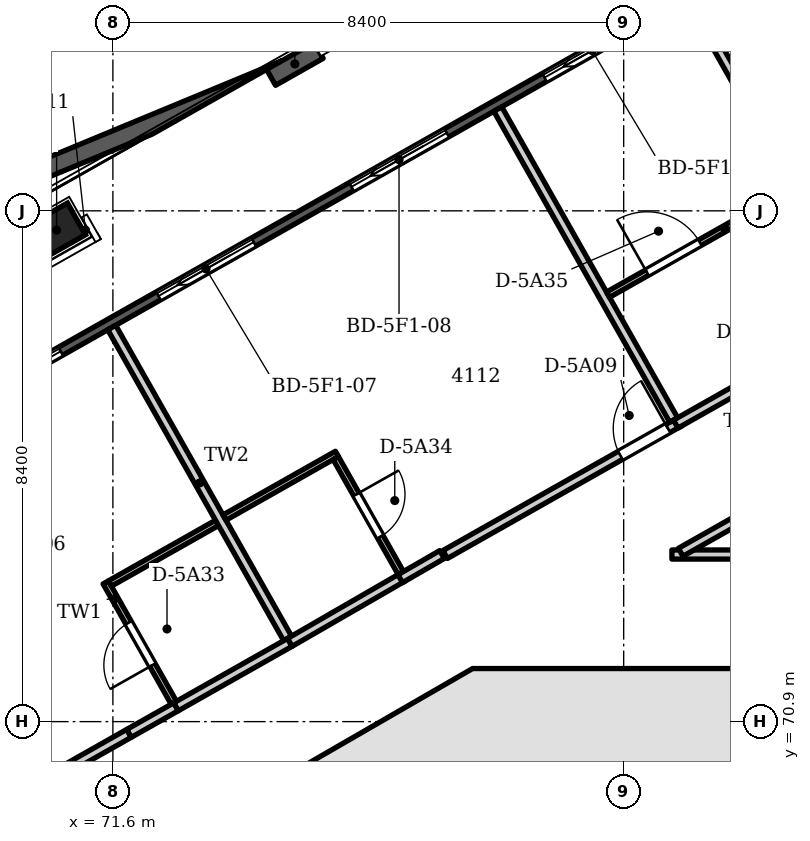
"""IFC4 building model, lengths in metres.
Left out: names, types, materials, properties, quantities, classifications, styles, units other than length and angle.
Written with IfcOpenShell. Run it as: python <this file> out.ifc"""

import sys

from ifc_helpers import new_model, si_unit, direction, frame, frame_2d, origin, origin_2d, place, context, subcontext, project, spatial, polyline, rectangle, outline, extrude, element, fill, save


model = new_model("IFC4")
c1 = context("Model", 3, precision=1e-05, world=origin(), true_north=direction((0.0, 1.0)))
c2 = subcontext(c1, "Body", "Model", "MODEL_VIEW")
j1 = project(units=[si_unit("LENGTHUNIT", "METRE"), si_unit("PLANEANGLEUNIT", "RADIAN")], contexts=[c1])
p1 = place(None, origin())
s1 = spatial("IfcSite", under=j1, at=p1, CompositionType="ELEMENT")
p2 = place(p1, origin())
s2 = spatial("IfcBuilding", under=s1, at=p2, CompositionType="ELEMENT")
p3 = place(p2, frame((0.0, 0.0, 161.1)))
s3 = spatial("IfcBuildingStorey", under=s2, at=p3, CompositionType="ELEMENT", Elevation=161.1)
p4 = place(p3, frame((82.485, 71.323, 0.0), z_axis=(0.0, 0.0, 1.0), x_axis=(-1.0, 0.0, 0.0)))
e1 = element("IfcWall", 1, at=p4, inside=s3, PredefinedType="SHEAR", context=c2, shape_type="SweptSolid", body=[
    extrude(outline(polyline([(0.0, -0.45), (4.969, -0.45), (4.728, 0.45), (0.241, 0.45), (0.0, -0.45)])), origin(), (0.0, 0.0, 1.0), 3.6),
])
p5 = place(p4, frame((1.785, 0.0, 0.0)))
e2 = element("IfcOpeningElement", 2, at=p5, cuts=e1, PredefinedType="OPENING", context=c2, shape_type="SweptSolid", body=[
    extrude(rectangle(XDim=1.4, YDim=2.1, at=frame_2d((0.7, 1.05))), frame((0.0, 0.46, 0.0), z_axis=(0.0, -1.0, 0.0), x_axis=(1.0, 0.0, 0.0)), (0.0, 0.0, 1.0), 0.92),
])
p6 = place(p3, frame((77.74, 71.383, 0.0), z_axis=(0.0, 0.0, 1.0), x_axis=(-0.866003133579, -0.500038571144, 0.0)))
e3 = element("IfcWall", 3, at=p6, inside=s3, PredefinedType="SHEAR", context=c2, shape_type="SweptSolid", body=[
    extrude(outline(polyline([(0.0, -0.45), (4.969, -0.45), (4.728, 0.45), (0.241, 0.45), (0.0, -0.45)])), origin(), (0.0, 0.0, 1.0), 3.6),
])
p7 = place(p6, frame((0.895, 0.0, 0.0)))
e4 = element("IfcOpeningElement", 4, at=p7, cuts=e3, PredefinedType="OPENING", context=c2, shape_type="SweptSolid", body=[
    extrude(rectangle(XDim=0.9, YDim=2.1, at=frame_2d((0.45, 1.05))), frame((0.0, 0.46, 0.0), z_axis=(0.0, -1.0, 0.0), x_axis=(1.0, 0.0, 0.0)), (0.0, 0.0, 1.0), 0.92),
])
p8 = place(p6, frame((3.184, 0.0, 0.0)))
e5 = element("IfcOpeningElement", 5, at=p8, cuts=e3, PredefinedType="OPENING", context=c2, shape_type="SweptSolid", body=[
    extrude(rectangle(XDim=0.9, YDim=2.1, at=frame_2d((0.45, 1.05))), frame((0.0, 0.46, 0.0), z_axis=(0.0, -1.0, 0.0), x_axis=(1.0, 0.0, 0.0)), (0.0, 0.0, 1.0), 0.92),
])
for number, where, z_axis, x_axis in (
    (6, (78.425, 63.001, 0.0), (0.0, 0.0, 1.0), (0.0, 1.0, 0.0)),
    (7, (81.575, 63.001, 0.0), (0.0, 0.0, 1.0), (0.0, 1.0, 0.0)),
):
    element("IfcWall", number, at=place(p3, frame(where, z_axis=z_axis, x_axis=x_axis)), inside=s3, PredefinedType="SHEAR", context=c2, shape_type="SweptSolid", body=[
        extrude(rectangle(XDim=7.872, YDim=0.3, at=frame_2d((3.936, 0.0))), origin(), (0.0, 0.0, 1.0), 3.6),
    ])
p9 = place(p3, frame((70.675, 78.982, -0.35), z_axis=(0.0, 0.0, 1.0), x_axis=(0.87035569594, 0.492423560103, 0.0)))
e8 = element("IfcColumn", 8, at=p9, inside=s3, PredefinedType="COLUMN", context=c2, shape_type="SweptSolid", body=[
    extrude(rectangle(XDim=0.75, YDim=0.6, at=origin_2d()), origin(), (0.0, 0.0, 1.0), 3.95),
])
p10 = place(p3, frame((52.498, 66.67, 0.0), z_axis=(0.0, 0.0, 1.0), x_axis=(0.870354973249, 0.492424837453, 0.0)))
e9 = element("IfcWall", 9, at=p10, inside=s3, PredefinedType="SOLIDWALL", context=c2, shape_type="SweptSolid", body=[
    extrude(outline(polyline([(0.149, 0.075), (0.149, -0.075), (43.617, -0.075), (43.617, 0.075), (0.149, 0.075)])), origin(), (0.0, 0.0, 1.0), 3.3),
])
p11 = place(p10, frame((1.224, 0.0, 0.0)))
e10 = element("IfcOpeningElement", 10, at=p11, cuts=e9, PredefinedType="OPENING", context=c2, shape_type="SweptSolid", body=[
    extrude(rectangle(XDim=1.8, YDim=2.6, at=frame_2d((0.9, 1.3))), frame((0.0, 0.085, 0.0), z_axis=(0.0, -1.0, 0.0), x_axis=(1.0, 0.0, 0.0)), (0.0, 0.0, 1.0), 0.17),
])
p12 = place(p10, frame((4.571, 0.0, 0.0)))
e11 = element("IfcOpeningElement", 11, at=p12, cuts=e9, PredefinedType="OPENING", context=c2, shape_type="SweptSolid", body=[
    extrude(rectangle(XDim=1.8, YDim=2.6, at=frame_2d((0.9, 1.3))), frame((0.0, 0.085, 0.0), z_axis=(0.0, -1.0, 0.0), x_axis=(1.0, 0.0, 0.0)), (0.0, 0.0, 1.0), 0.17),
])
p13 = place(p10, frame((8.218, 0.0, 0.0)))
e12 = element("IfcOpeningElement", 12, at=p13, cuts=e9, PredefinedType="OPENING", context=c2, shape_type="SweptSolid", body=[
    extrude(rectangle(XDim=1.8, YDim=2.6, at=frame_2d((0.9, 1.3))), frame((0.0, 0.085, 0.0), z_axis=(0.0, -1.0, 0.0), x_axis=(1.0, 0.0, 0.0)), (0.0, 0.0, 1.0), 0.17),
])
p14 = place(p10, frame((11.865, 0.0, 0.0)))
e13 = element("IfcOpeningElement", 13, at=p14, cuts=e9, PredefinedType="OPENING", context=c2, shape_type="SweptSolid", body=[
    extrude(rectangle(XDim=1.8, YDim=2.6, at=frame_2d((0.9, 1.3))), frame((0.0, 0.085, 0.0), z_axis=(0.0, -1.0, 0.0), x_axis=(1.0, 0.0, 0.0)), (0.0, 0.0, 1.0), 0.17),
])
p15 = place(p10, frame((15.512, 0.0, 0.0)))
e14 = element("IfcOpeningElement", 14, at=p15, cuts=e9, PredefinedType="OPENING", context=c2, shape_type="SweptSolid", body=[
    extrude(rectangle(XDim=1.8, YDim=2.6, at=frame_2d((0.9, 1.3))), frame((0.0, 0.085, 0.0), z_axis=(0.0, -1.0, 0.0), x_axis=(1.0, 0.0, 0.0)), (0.0, 0.0, 1.0), 0.17),
])
p16 = place(p10, frame((19.16, 0.0, 0.0)))
e15 = element("IfcOpeningElement", 15, at=p16, cuts=e9, PredefinedType="OPENING", context=c2, shape_type="SweptSolid", body=[
    extrude(rectangle(XDim=1.8, YDim=2.6, at=frame_2d((0.9, 1.3))), frame((0.0, 0.085, 0.0), z_axis=(0.0, -1.0, 0.0), x_axis=(1.0, 0.0, 0.0)), (0.0, 0.0, 1.0), 0.17),
])
p17 = place(p10, frame((22.807, 0.0, 0.0)))
e16 = element("IfcOpeningElement", 16, at=p17, cuts=e9, PredefinedType="OPENING", context=c2, shape_type="SweptSolid", body=[
    extrude(rectangle(XDim=1.8, YDim=2.6, at=frame_2d((0.9, 1.3))), frame((0.0, 0.085, 0.0), z_axis=(0.0, -1.0, 0.0), x_axis=(1.0, 0.0, 0.0)), (0.0, 0.0, 1.0), 0.17),
])
p18 = place(p10, frame((26.454, 0.0, 0.0)))
e17 = element("IfcOpeningElement", 17, at=p18, cuts=e9, PredefinedType="OPENING", context=c2, shape_type="SweptSolid", body=[
    extrude(rectangle(XDim=1.8, YDim=2.6, at=frame_2d((0.9, 1.3))), frame((0.0, 0.085, 0.0), z_axis=(0.0, -1.0, 0.0), x_axis=(1.0, 0.0, 0.0)), (0.0, 0.0, 1.0), 0.17),
])
p19 = place(p10, frame((30.101, 0.0, 0.0)))
e18 = element("IfcOpeningElement", 18, at=p19, cuts=e9, PredefinedType="OPENING", context=c2, shape_type="SweptSolid", body=[
    extrude(rectangle(XDim=1.8, YDim=2.6, at=frame_2d((0.9, 1.3))), frame((0.0, 0.085, 0.0), z_axis=(0.0, -1.0, 0.0), x_axis=(1.0, 0.0, 0.0)), (0.0, 0.0, 1.0), 0.17),
])
p20 = place(p10, frame((33.748, 0.0, 0.0)))
e19 = element("IfcOpeningElement", 19, at=p20, cuts=e9, PredefinedType="OPENING", context=c2, shape_type="SweptSolid", body=[
    extrude(rectangle(XDim=1.8, YDim=2.6, at=frame_2d((0.9, 1.3))), frame((0.0, 0.085, 0.0), z_axis=(0.0, -1.0, 0.0), x_axis=(1.0, 0.0, 0.0)), (0.0, 0.0, 1.0), 0.17),
])
p21 = place(p10, frame((37.396, 0.0, 0.0)))
e20 = element("IfcOpeningElement", 20, at=p21, cuts=e9, PredefinedType="OPENING", context=c2, shape_type="SweptSolid", body=[
    extrude(rectangle(XDim=1.8, YDim=2.6, at=frame_2d((0.9, 1.3))), frame((0.0, 0.085, 0.0), z_axis=(0.0, -1.0, 0.0), x_axis=(1.0, 0.0, 0.0)), (0.0, 0.0, 1.0), 0.17),
])
p22 = place(p10, frame((40.743, 0.0, 0.0)))
e21 = element("IfcOpeningElement", 21, at=p22, cuts=e9, PredefinedType="OPENING", context=c2, shape_type="SweptSolid", body=[
    extrude(rectangle(XDim=1.8, YDim=2.6, at=frame_2d((0.9, 1.3))), frame((0.0, 0.085, 0.0), z_axis=(0.0, -1.0, 0.0), x_axis=(1.0, 0.0, 0.0)), (0.0, 0.0, 1.0), 0.17),
])
p23 = place(p3, origin())
e22 = element("IfcWall", 22, at=p23, inside=s3, PredefinedType="PARAPET", context=c2, shape_type="SweptSolid", body=[
    extrude(outline(polyline([(74.388, 81.773), (46.836, 70.36), (47.111, 70.149), (72.246, 80.561), (74.388, 81.773)])), origin(), (0.0, 0.0, 1.0), 1.1),
])
p24 = place(p3, origin())
e23 = element("IfcWall", 23, at=p24, inside=s3, PredefinedType="PARAPET", context=c2, shape_type="SweptSolid", body=[
    extrude(outline(polyline([(74.127, 81.625), (74.275, 81.364), (75.058, 81.807), (74.91, 82.068), (74.88, 82.051), (74.127, 81.625)])), origin(), (0.0, 0.0, 1.0), 1.1),
])
p25 = place(p3, frame((65.831, 67.292, 0.0), z_axis=(0.0, 0.0, 1.0), x_axis=(0.870315513683, 0.492494575242, 0.0)))
e24 = element("IfcWall", 24, at=p25, inside=s3, PredefinedType="PARTITIONING", context=c2, shape_type="SweptSolid", body=[
    extrude(rectangle(XDim=6.934, YDim=0.15, at=frame_2d((3.467, 0.0))), origin(), (0.0, 0.0, 1.0), 3.3),
])
p26 = place(p25, frame((0.15, 0.0, 0.0)))
e25 = element("IfcOpeningElement", 25, at=p26, cuts=e24, PredefinedType="OPENING", context=c2, shape_type="SweptSolid", body=[
    extrude(rectangle(XDim=0.9, YDim=2.1, at=frame_2d((0.45, 1.05))), frame((0.0, 0.085, 0.0), z_axis=(0.0, -1.0, 0.0), x_axis=(1.0, 0.0, 0.0)), (0.0, 0.0, 1.0), 0.17),
])
p27 = place(p3, frame((71.482, 73.189, 0.0), z_axis=(0.0, 0.0, 1.0), x_axis=(0.492181026221, -0.870492870406, 0.0)))
e26 = element("IfcWall", 26, at=p27, inside=s3, PredefinedType="PARTITIONING", context=c2, shape_type="SweptSolid", body=[
    extrude(rectangle(XDim=2.275, YDim=0.1, at=frame_2d((1.137, 0.0))), origin(), (0.0, 0.0, 1.0), 3.3),
])
p28 = place(p27, frame((0.762, 0.0, 0.0)))
e27 = element("IfcOpeningElement", 27, at=p28, cuts=e26, PredefinedType="OPENING", context=c2, shape_type="SweptSolid", body=[
    extrude(rectangle(XDim=0.8, YDim=2.1, at=frame_2d((0.4, 1.05))), frame((0.0, 0.06, 0.0), z_axis=(0.0, -1.0, 0.0), x_axis=(1.0, 0.0, 0.0)), (0.0, 0.0, 1.0), 0.12),
])
p29 = place(p3, frame((71.551, 73.171, 0.0), z_axis=(0.0, 0.0, 1.0), x_axis=(0.87023930122, 0.492629230367, 0.0)))
e28 = element("IfcWall", 28, at=p29, inside=s3, PredefinedType="PARTITIONING", context=c2, shape_type="SweptSolid", body=[
    extrude(rectangle(XDim=2.025, YDim=0.1, at=frame_2d((1.012, 0.0))), origin(), (0.0, 0.0, 1.0), 3.3),
])
p30 = place(p3, frame((71.581, 77.381, 0.0), z_axis=(0.0, 0.0, 1.0), x_axis=(0.4923790567, -0.870380873252, 0.0)))
e29 = element("IfcWall", 29, at=p30, inside=s3, PredefinedType="PARTITIONING", context=c2, shape_type="SweptSolid", body=[
    extrude(rectangle(XDim=5.874, YDim=0.15, at=frame_2d((2.937, 0.0))), origin(), (0.0, 0.0, 1.0), 3.3),
])
p31 = place(p3, frame((71.866, 70.707, 0.0), z_axis=(0.0, 0.0, 1.0), x_axis=(0.870501381105, 0.492165973524, 0.0)))
e30 = element("IfcWall", 30, at=p31, inside=s3, PredefinedType="PARTITIONING", context=c2, shape_type="SweptSolid", body=[
    extrude(rectangle(XDim=0.888, YDim=0.15, at=frame_2d((0.444, 0.0))), origin(), (0.0, 0.0, 1.0), 3.3),
])
p32 = place(p3, frame((72.639, 71.144, 0.0), z_axis=(0.0, 0.0, 1.0), x_axis=(0.870311041837, 0.492502477615, 0.0)))
e31 = element("IfcWall", 31, at=p32, inside=s3, PredefinedType="PARTITIONING", context=c2, shape_type="SweptSolid", body=[
    extrude(rectangle(XDim=2.15, YDim=0.15, at=frame_2d((1.075, 0.0))), origin(), (0.0, 0.0, 1.0), 3.3),
])
p33 = place(p3, frame((73.435, 74.256, 0.0), z_axis=(0.0, 0.0, 1.0), x_axis=(0.870265219316, 0.492583442726, 0.0)))
e32 = element("IfcWall", 32, at=p33, inside=s3, PredefinedType="PARTITIONING", context=c2, shape_type="SweptSolid", body=[
    extrude(rectangle(XDim=2.125, YDim=0.1, at=frame_2d((1.062, 0.0))), origin(), (0.0, 0.0, 1.0), 3.3),
])
p34 = place(p3, frame((74.51, 72.203, 0.0), z_axis=(0.0, 0.0, 1.0), x_axis=(0.865945810508, 0.500137834266, 0.0)))
e33 = element("IfcWall", 33, at=p34, inside=s3, PredefinedType="PARTITIONING", context=c2, shape_type="SweptSolid", body=[
    extrude(rectangle(XDim=2.154, YDim=0.15, at=frame_2d((1.077, 0.0))), origin(), (0.0, 0.0, 1.0), 3.3),
])
p35 = place(p3, frame((75.266, 75.235, 0.0), z_axis=(0.0, 0.0, 1.0), x_axis=(0.492249770031, -0.870453998729, 0.0)))
e34 = element("IfcWall", 34, at=p35, inside=s3, PredefinedType="PARTITIONING", context=c2, shape_type="SweptSolid", body=[
    extrude(rectangle(XDim=2.173, YDim=0.1, at=frame_2d((1.086, 0.0))), origin(), (0.0, 0.0, 1.0), 3.3),
])
p36 = place(p35, frame((0.686, 0.0, 0.0)))
e35 = element("IfcOpeningElement", 35, at=p36, cuts=e34, PredefinedType="OPENING", context=c2, shape_type="SweptSolid", body=[
    extrude(rectangle(XDim=0.8, YDim=2.1, at=frame_2d((0.4, 1.05))), frame((0.0, 0.06, 0.0), z_axis=(0.0, -1.0, 0.0), x_axis=(1.0, 0.0, 0.0)), (0.0, 0.0, 1.0), 0.12),
])
p37 = place(p3, frame((76.326, 73.251, 0.0), z_axis=(0.0, 0.0, 1.0), x_axis=(0.865924288798, 0.500175095412, 0.0)))
e36 = element("IfcWall", 36, at=p37, inside=s3, PredefinedType="PARTITIONING", context=c2, shape_type="SweptSolid", body=[
    extrude(rectangle(XDim=0.794, YDim=0.15, at=frame_2d((0.397, 0.0))), origin(), (0.0, 0.0, 1.0), 3.3),
])
p38 = place(p3, frame((77.064, 73.648, 0.0), z_axis=(0.0, 0.0, 1.0), x_axis=(0.870327135276, 0.492474037491, 0.0)))
e37 = element("IfcWall", 37, at=p38, inside=s3, PredefinedType="PARTITIONING", context=c2, shape_type="SweptSolid", body=[
    extrude(rectangle(XDim=4.439, YDim=0.15, at=frame_2d((2.219, 0.0))), origin(), (0.0, 0.0, 1.0), 3.3),
])
p39 = place(p38, frame((3.31, 0.0, 0.0)))
e38 = element("IfcOpeningElement", 38, at=p39, cuts=e37, PredefinedType="OPENING", context=c2, shape_type="SweptSolid", body=[
    extrude(rectangle(XDim=0.9, YDim=2.1, at=frame_2d((0.45, 1.05))), frame((0.0, 0.085, 0.0), z_axis=(0.0, -1.0, 0.0), x_axis=(1.0, 0.0, 0.0)), (0.0, 0.0, 1.0), 0.17),
])
p40 = place(p3, frame((77.93, 80.973, 0.0), z_axis=(0.0, 0.0, 1.0), x_axis=(0.4923790567, -0.870380873252, 0.0)))
e39 = element("IfcWall", 39, at=p40, inside=s3, PredefinedType="PARTITIONING", context=c2, shape_type="SweptSolid", body=[
    extrude(rectangle(XDim=5.874, YDim=0.15, at=frame_2d((2.937, 0.0))), origin(), (0.0, 0.0, 1.0), 3.3),
])
p41 = place(p3, frame((79.742, 77.921, 0.0), z_axis=(0.0, 0.0, 1.0), x_axis=(0.870364731179, 0.49240759003, 0.0)))
e40 = element("IfcWall", 40, at=p41, inside=s3, PredefinedType="PARTITIONING", context=c2, shape_type="SweptSolid", body=[
    extrude(rectangle(XDim=2.526, YDim=0.1, at=frame_2d((1.263, 0.0))), origin(), (0.0, 0.0, 1.0), 3.3),
])
p42 = place(p41, frame((0.738, 0.0, 0.0)))
e41 = element("IfcOpeningElement", 41, at=p42, cuts=e40, PredefinedType="OPENING", context=c2, shape_type="SweptSolid", body=[
    extrude(rectangle(XDim=1.0, YDim=2.1, at=frame_2d((0.5, 1.05))), frame((0.0, 0.06, 0.0), z_axis=(0.0, -1.0, 0.0), x_axis=(1.0, 0.0, 0.0)), (0.0, 0.0, 1.0), 0.12),
])
p43 = place(p3, frame((80.856, 75.793, 0.0), z_axis=(0.0, 0.0, 1.0), x_axis=(0.870296246949, 0.492528621043, 0.0)))
e42 = element("IfcWall", 42, at=p43, inside=s3, PredefinedType="PARTITIONING", context=c2, shape_type="SweptSolid", body=[
    extrude(rectangle(XDim=4.812, YDim=0.15, at=frame_2d((2.406, 0.0))), origin(), (0.0, 0.0, 1.0), 3.3),
])
p44 = place(p43, frame((2.801, 0.0, 0.0)))
e43 = element("IfcOpeningElement", 43, at=p44, cuts=e42, PredefinedType="OPENING", context=c2, shape_type="SweptSolid", body=[
    extrude(rectangle(XDim=0.8, YDim=2.1, at=frame_2d((0.4, 1.05))), frame((0.0, 0.085, 0.0), z_axis=(0.0, -1.0, 0.0), x_axis=(1.0, 0.0, 0.0)), (0.0, 0.0, 1.0), 0.17),
])
p45 = place(p3, frame((80.793, 73.648, 0.0), z_axis=(0.0, 0.0, 1.0), x_axis=(1.0, 0.0, 0.0)))
e44 = element("IfcWall", 44, at=p45, inside=s3, PredefinedType="PARTITIONING", context=c2, shape_type="SweptSolid", body=[
    extrude(rectangle(XDim=2.269, YDim=0.15, at=frame_2d((1.135, 0.0))), origin(), (0.0, 0.0, 1.0), 3.3),
])
p46 = place(p3, frame((80.937, 73.685, 0.0), z_axis=(0.0, 0.0, 1.0), x_axis=(0.870319748897, 0.492487090876, 0.0)))
e45 = element("IfcWall", 45, at=p46, inside=s3, PredefinedType="PARTITIONING", context=c2, shape_type="SweptSolid", body=[
    extrude(rectangle(XDim=4.772, YDim=0.15, at=frame_2d((2.386, 0.0))), origin(), (0.0, 0.0, 1.0), 3.3),
])
p47 = place(p3, frame((81.104, 82.769, 0.0), z_axis=(0.0, 0.0, 1.0), x_axis=(0.492361245758, -0.870390948756, 0.0)))
e46 = element("IfcWall", 46, at=p47, inside=s3, PredefinedType="PARTITIONING", context=c2, shape_type="SweptSolid", body=[
    extrude(rectangle(XDim=5.875, YDim=0.15, at=frame_2d((2.937, 0.0))), origin(), (0.0, 0.0, 1.0), 3.3),
])
p48 = place(p16, origin())
e47 = element("IfcDoor", 47, at=p48, inside=s3, OperationType="SLIDING_TO_LEFT", PredefinedType="DOOR", context=c2, shape_type="SweptSolid", body=[
    extrude(rectangle(XDim=1.8, YDim=2.6, at=frame_2d((0.9, 1.3))), frame((0.0, 0.025, 0.0), z_axis=(0.0, -1.0, 0.0), x_axis=(1.0, 0.0, 0.0)), (0.0, 0.0, 1.0), 0.05),
])
fill(e15, e47)
p49 = place(p17, origin())
e48 = element("IfcDoor", 48, at=p49, inside=s3, OperationType="SLIDING_TO_LEFT", PredefinedType="DOOR", context=c2, shape_type="SweptSolid", body=[
    extrude(rectangle(XDim=1.8, YDim=2.6, at=frame_2d((0.9, 1.3))), frame((0.0, 0.025, 0.0), z_axis=(0.0, -1.0, 0.0), x_axis=(1.0, 0.0, 0.0)), (0.0, 0.0, 1.0), 0.05),
])
fill(e16, e48)
p50 = place(p18, origin())
e49 = element("IfcDoor", 49, at=p50, inside=s3, OperationType="SLIDING_TO_LEFT", PredefinedType="DOOR", context=c2, shape_type="SweptSolid", body=[
    extrude(rectangle(XDim=1.8, YDim=2.6, at=frame_2d((0.9, 1.3))), frame((0.0, 0.025, 0.0), z_axis=(0.0, -1.0, 0.0), x_axis=(1.0, 0.0, 0.0)), (0.0, 0.0, 1.0), 0.05),
])
fill(e17, e49)
p51 = place(p19, origin())
e50 = element("IfcDoor", 50, at=p51, inside=s3, OperationType="SLIDING_TO_LEFT", PredefinedType="DOOR", context=c2, shape_type="SweptSolid", body=[
    extrude(rectangle(XDim=1.8, YDim=2.6, at=frame_2d((0.9, 1.3))), frame((0.0, 0.025, 0.0), z_axis=(0.0, -1.0, 0.0), x_axis=(1.0, 0.0, 0.0)), (0.0, 0.0, 1.0), 0.05),
])
fill(e18, e50)
p52 = place(p39, origin())
e51 = element("IfcDoor", 51, at=p52, inside=s3, OperationType="SINGLE_SWING_RIGHT", PredefinedType="DOOR", context=c2, shape_type="SweptSolid", body=[
    extrude(rectangle(XDim=0.9, YDim=2.1, at=frame_2d((0.45, 1.05))), frame((0.0, 0.025, 0.0), z_axis=(0.0, -1.0, 0.0), x_axis=(1.0, 0.0, 0.0)), (0.0, 0.0, 1.0), 0.05),
])
fill(e38, e51)
p53 = place(p28, frame((0.8, 0.0, 0.0), z_axis=(0.0, 0.0, 1.0), x_axis=(-1.0, 0.0, 0.0)))
e52 = element("IfcDoor", 52, at=p53, inside=s3, OperationType="SINGLE_SWING_LEFT", PredefinedType="DOOR", context=c2, shape_type="SweptSolid", body=[
    extrude(rectangle(XDim=0.8, YDim=2.1, at=frame_2d((0.4, 1.05))), frame((0.0, 0.025, 0.0), z_axis=(0.0, -1.0, 0.0), x_axis=(1.0, 0.0, 0.0)), (0.0, 0.0, 1.0), 0.05),
])
fill(e27, e52)
p54 = place(p36, origin())
e53 = element("IfcDoor", 53, at=p54, inside=s3, OperationType="SINGLE_SWING_LEFT", PredefinedType="DOOR", context=c2, shape_type="SweptSolid", body=[
    extrude(rectangle(XDim=0.8, YDim=2.1, at=frame_2d((0.4, 1.05))), frame((0.0, 0.025, 0.0), z_axis=(0.0, -1.0, 0.0), x_axis=(1.0, 0.0, 0.0)), (0.0, 0.0, 1.0), 0.05),
])
fill(e35, e53)
p55 = place(p42, origin())
e54 = element("IfcDoor", 54, at=p55, inside=s3, OperationType="SINGLE_SWING_LEFT", PredefinedType="DOOR", context=c2, shape_type="SweptSolid", body=[
    extrude(rectangle(XDim=1.0, YDim=2.1, at=frame_2d((0.5, 1.05))), frame((0.0, 0.025, 0.0), z_axis=(0.0, -1.0, 0.0), x_axis=(1.0, 0.0, 0.0)), (0.0, 0.0, 1.0), 0.05),
])
fill(e41, e54)
p56 = place(p5, origin())
e55 = element("IfcDoor", 55, at=p56, inside=s3, OperationType="DOUBLE_DOOR_SINGLE_SWING", PredefinedType="DOOR", context=c2, shape_type="SweptSolid", body=[
    extrude(rectangle(XDim=1.4, YDim=2.1, at=frame_2d((0.7, 1.05))), frame((0.0, 0.025, 0.0), z_axis=(0.0, -1.0, 0.0), x_axis=(1.0, 0.0, 0.0)), (0.0, 0.0, 1.0), 0.05),
])
fill(e2, e55)
p57 = place(p7, origin())
e56 = element("IfcDoor", 56, at=p57, inside=s3, OperationType="SINGLE_SWING_LEFT", PredefinedType="DOOR", context=c2, shape_type="SweptSolid", body=[
    extrude(rectangle(XDim=0.9, YDim=2.1, at=frame_2d((0.45, 1.05))), frame((0.0, 0.175, 0.0), z_axis=(0.0, -1.0, 0.0), x_axis=(1.0, 0.0, 0.0)), (0.0, 0.0, 1.0), 0.05),
])
fill(e4, e56)
save(model, sys.argv[1])
